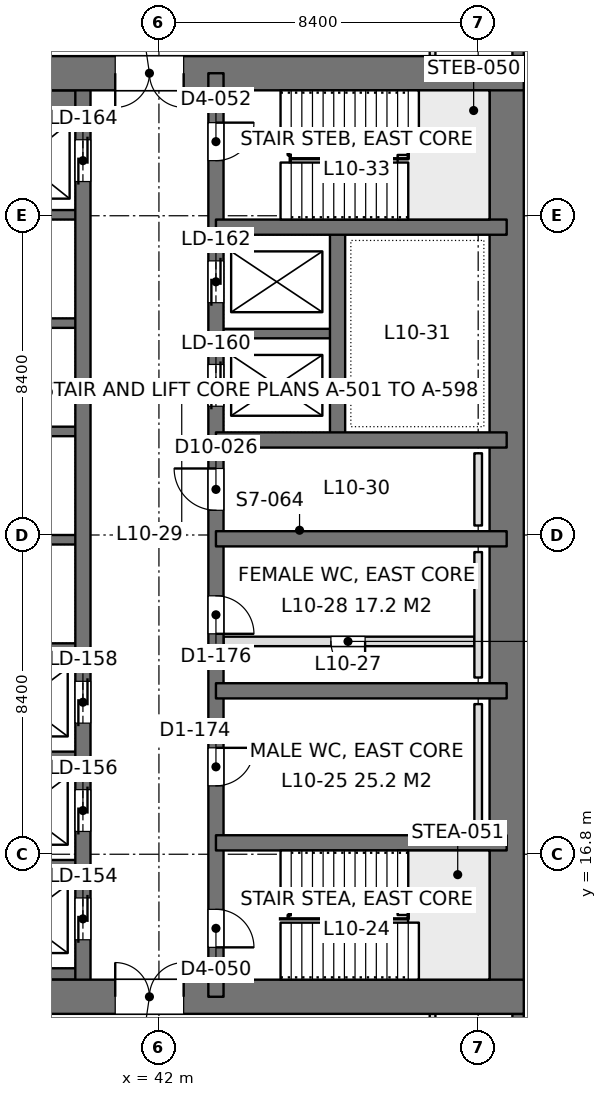
"""IFC4 building model, lengths in metres.
Left out: names, types, materials, properties, quantities, classifications, styles, units other than length and angle.
Written with IfcOpenShell. Run it as: python <this file> out.ifc"""

import sys

from ifc_helpers import new_model, si_unit, direction, frame, frame_2d, origin, place, context, subcontext, project, spatial, rectangle, extrude, element, fill, save


model = new_model("IFC4")
c1 = context("Model", 3, precision=1e-05, world=origin(), true_north=direction((0.0, 1.0)))
c2 = subcontext(c1, "Body", "Model", "MODEL_VIEW")
j1 = project(units=[si_unit("LENGTHUNIT", "METRE"), si_unit("PLANEANGLEUNIT", "RADIAN")], contexts=[c1])
p1 = place(None, origin())
s1 = spatial("IfcSite", under=j1, at=p1, CompositionType="ELEMENT")
p2 = place(p1, origin())
s2 = spatial("IfcBuilding", under=s1, at=p2, CompositionType="ELEMENT")
p3 = place(p2, frame((0.0, 0.0, 45.9)))
s3 = spatial("IfcBuildingStorey", under=s2, at=p3, CompositionType="ELEMENT", Elevation=45.9)
p4 = place(p3, frame((33.6, 13.05, 0.0), z_axis=(0.0, 0.0, 1.0), x_axis=(1.0, 0.0, 0.0)))
e1 = element("IfcWall", 1, at=p4, inside=s3, PredefinedType="SHEAR", context=c2, shape_type="SweptSolid", body=[
    extrude(rectangle(XDim=18.0, YDim=0.9, at=frame_2d((9.0, 0.0))), origin(), (0.0, 0.0, 1.0), 4.5),
])
p5 = place(p4, frame((7.25, 0.0, 0.0)))
e2 = element("IfcOpeningElement", 2, at=p5, cuts=e1, PredefinedType="OPENING", context=c2, shape_type="SweptSolid", body=[
    extrude(rectangle(XDim=1.8, YDim=2.4, at=frame_2d((0.9, 1.2))), frame((0.0, 0.46, 0.0), z_axis=(0.0, -1.0, 0.0), x_axis=(1.0, 0.0, 0.0)), (0.0, 0.0, 1.0), 0.92),
])
p6 = place(p3, frame((33.6, 37.35, 0.0), z_axis=(0.0, 0.0, 1.0), x_axis=(1.0, 0.0, 0.0)))
e3 = element("IfcWall", 3, at=p6, inside=s3, PredefinedType="SHEAR", context=c2, shape_type="SweptSolid", body=[
    extrude(rectangle(XDim=18.0, YDim=0.9, at=frame_2d((9.0, 0.0))), origin(), (0.0, 0.0, 1.0), 4.5),
])
p7 = place(p6, frame((7.25, 0.0, 0.0)))
e4 = element("IfcOpeningElement", 4, at=p7, cuts=e3, PredefinedType="OPENING", context=c2, shape_type="SweptSolid", body=[
    extrude(rectangle(XDim=1.8, YDim=2.4, at=frame_2d((0.9, 1.2))), frame((0.0, 0.46, 0.0), z_axis=(0.0, -1.0, 0.0), x_axis=(1.0, 0.0, 0.0)), (0.0, 0.0, 1.0), 0.92),
])
p8 = place(p3, frame((51.15, 13.05, 0.0), z_axis=(0.0, 0.0, 1.0), x_axis=(0.0, 1.0, 0.0)))
e5 = element("IfcWall", 5, at=p8, inside=s3, PredefinedType="SHEAR", context=c2, shape_type="SweptSolid", body=[
    extrude(rectangle(XDim=24.3, YDim=0.9, at=frame_2d((12.15, 0.0))), origin(), (0.0, 0.0, 1.0), 4.5),
])
p9 = place(p3, frame((43.5, 13.05, 0.0), z_axis=(0.0, 0.0, 1.0), x_axis=(0.0, 1.0, 0.0)))
e6 = element("IfcWall", 6, at=p9, inside=s3, PredefinedType="SHEAR", context=c2, shape_type="SweptSolid", body=[
    extrude(rectangle(XDim=24.3, YDim=0.4, at=frame_2d((12.15, 0.0))), origin(), (0.0, 0.0, 1.0), 4.5),
])
p10 = place(p9, frame((1.3, 0.0, 0.0)))
e7 = element("IfcOpeningElement", 7, at=p10, cuts=e6, PredefinedType="OPENING", context=c2, shape_type="SweptSolid", body=[
    extrude(rectangle(XDim=1.0, YDim=2.2, at=frame_2d((0.5, 1.1))), frame((0.0, 0.21, 0.0), z_axis=(0.0, -1.0, 0.0), x_axis=(1.0, 0.0, 0.0)), (0.0, 0.0, 1.0), 0.42),
])
p11 = place(p9, frame((22.0, 0.0, 0.0)))
e8 = element("IfcOpeningElement", 8, at=p11, cuts=e6, PredefinedType="OPENING", context=c2, shape_type="SweptSolid", body=[
    extrude(rectangle(XDim=1.0, YDim=2.2, at=frame_2d((0.5, 1.1))), frame((0.0, 0.21, 0.0), z_axis=(0.0, -1.0, 0.0), x_axis=(1.0, 0.0, 0.0)), (0.0, 0.0, 1.0), 0.42),
])
p12 = place(p9, frame((5.55, 0.0, 0.0)))
e9 = element("IfcOpeningElement", 9, at=p12, cuts=e6, PredefinedType="OPENING", context=c2, shape_type="SweptSolid", body=[
    extrude(rectangle(XDim=1.0, YDim=2.2, at=frame_2d((0.5, 1.1))), frame((0.0, 0.21, 0.0), z_axis=(0.0, -1.0, 0.0), x_axis=(1.0, 0.0, 0.0)), (0.0, 0.0, 1.0), 0.42),
])
p13 = place(p9, frame((9.55, 0.0, 0.0)))
e10 = element("IfcOpeningElement", 10, at=p13, cuts=e6, PredefinedType="OPENING", context=c2, shape_type="SweptSolid", body=[
    extrude(rectangle(XDim=1.0, YDim=2.2, at=frame_2d((0.5, 1.1))), frame((0.0, 0.21, 0.0), z_axis=(0.0, -1.0, 0.0), x_axis=(1.0, 0.0, 0.0)), (0.0, 0.0, 1.0), 0.42),
])
p14 = place(p9, frame((12.8, 0.0, 0.0)))
e11 = element("IfcOpeningElement", 11, at=p14, cuts=e6, PredefinedType="OPENING", context=c2, shape_type="SweptSolid", body=[
    extrude(rectangle(XDim=1.1, YDim=2.2, at=frame_2d((0.55, 1.1))), frame((0.0, 0.21, 0.0), z_axis=(0.0, -1.0, 0.0), x_axis=(1.0, 0.0, 0.0)), (0.0, 0.0, 1.0), 0.42),
])
p15 = place(p9, frame((15.538, 0.0, 0.0)))
e12 = element("IfcOpeningElement", 12, at=p15, cuts=e6, PredefinedType="OPENING", context=c2, shape_type="SweptSolid", body=[
    extrude(rectangle(XDim=1.1, YDim=2.2, at=frame_2d((0.55, 1.1))), frame((0.0, 0.21, 0.0), z_axis=(0.0, -1.0, 0.0), x_axis=(1.0, 0.0, 0.0)), (0.0, 0.0, 1.0), 0.42),
])
p16 = place(p9, frame((18.262, 0.0, 0.0)))
e13 = element("IfcOpeningElement", 13, at=p16, cuts=e6, PredefinedType="OPENING", context=c2, shape_type="SweptSolid", body=[
    extrude(rectangle(XDim=1.1, YDim=2.2, at=frame_2d((0.55, 1.1))), frame((0.0, 0.21, 0.0), z_axis=(0.0, -1.0, 0.0), x_axis=(1.0, 0.0, 0.0)), (0.0, 0.0, 1.0), 0.42),
])
p17 = place(p3, frame((40.0, 13.05, 0.0), z_axis=(0.0, 0.0, 1.0), x_axis=(0.0, 1.0, 0.0)))
e14 = element("IfcWall", 14, at=p17, inside=s3, PredefinedType="SHEAR", context=c2, shape_type="SweptSolid", body=[
    extrude(rectangle(XDim=24.3, YDim=0.4, at=frame_2d((12.15, 0.0))), origin(), (0.0, 0.0, 1.0), 4.5),
])
p18 = place(p17, frame((1.5, 0.0, 0.0)))
e15 = element("IfcOpeningElement", 15, at=p18, cuts=e14, PredefinedType="OPENING", context=c2, shape_type="SweptSolid", body=[
    extrude(rectangle(XDim=1.1, YDim=2.2, at=frame_2d((0.55, 1.1))), frame((0.0, 0.21, 0.0), z_axis=(0.0, -1.0, 0.0), x_axis=(1.0, 0.0, 0.0)), (0.0, 0.0, 1.0), 0.42),
])
p19 = place(p17, frame((4.35, 0.0, 0.0)))
e16 = element("IfcOpeningElement", 16, at=p19, cuts=e14, PredefinedType="OPENING", context=c2, shape_type="SweptSolid", body=[
    extrude(rectangle(XDim=1.1, YDim=2.2, at=frame_2d((0.55, 1.1))), frame((0.0, 0.21, 0.0), z_axis=(0.0, -1.0, 0.0), x_axis=(1.0, 0.0, 0.0)), (0.0, 0.0, 1.0), 0.42),
])
p20 = place(p17, frame((7.2, 0.0, 0.0)))
e17 = element("IfcOpeningElement", 17, at=p20, cuts=e14, PredefinedType="OPENING", context=c2, shape_type="SweptSolid", body=[
    extrude(rectangle(XDim=1.1, YDim=2.2, at=frame_2d((0.55, 1.1))), frame((0.0, 0.21, 0.0), z_axis=(0.0, -1.0, 0.0), x_axis=(1.0, 0.0, 0.0)), (0.0, 0.0, 1.0), 0.42),
])
p21 = place(p17, frame((21.45, 0.0, 0.0)))
e18 = element("IfcOpeningElement", 18, at=p21, cuts=e14, PredefinedType="OPENING", context=c2, shape_type="SweptSolid", body=[
    extrude(rectangle(XDim=1.1, YDim=2.2, at=frame_2d((0.55, 1.1))), frame((0.0, 0.21, 0.0), z_axis=(0.0, -1.0, 0.0), x_axis=(1.0, 0.0, 0.0)), (0.0, 0.0, 1.0), 0.42),
])
for number, where, z_axis, x_axis in (
    (19, (51.15, 17.1, 0.0), (0.0, 0.0, 1.0), (-1.0, 0.0, 0.0)),
    (20, (51.15, 21.1, 0.0), (0.0, 0.0, 1.0), (-1.0, 0.0, 0.0)),
    (21, (51.15, 25.1, 0.0), (0.0, 0.0, 1.0), (-1.0, 0.0, 0.0)),
    (22, (51.15, 27.7, 0.0), (0.0, 0.0, 1.0), (-1.0, 0.0, 0.0)),
    (23, (51.15, 33.3, 0.0), (0.0, 0.0, 1.0), (-1.0, 0.0, 0.0)),
):
    element("IfcWall", number, at=place(p3, frame(where, z_axis=z_axis, x_axis=x_axis)), inside=s3, PredefinedType="SHEAR", context=c2, shape_type="SweptSolid", body=[
        extrude(rectangle(XDim=7.65, YDim=0.4, at=frame_2d((3.825, 0.0))), origin(), (0.0, 0.0, 1.0), 4.5),
    ])
p22 = place(p3, frame((46.7, 27.7, 0.0), z_axis=(0.0, 0.0, 1.0), x_axis=(0.0, 1.0, 0.0)))
e24 = element("IfcWall", 24, at=p22, inside=s3, PredefinedType="SHEAR", context=c2, shape_type="SweptSolid", body=[
    extrude(rectangle(XDim=5.6, YDim=0.4, at=frame_2d((2.8, 0.0))), origin(), (0.0, 0.0, 1.0), 4.5),
])
p23 = place(p3, frame((46.7, 30.5, 0.0), z_axis=(0.0, 0.0, 1.0), x_axis=(-1.0, 0.0, 0.0)))
e25 = element("IfcWall", 25, at=p23, inside=s3, PredefinedType="SHEAR", context=c2, shape_type="SweptSolid", body=[
    extrude(rectangle(XDim=3.2, YDim=0.25, at=frame_2d((1.6, 0.0))), origin(), (0.0, 0.0, 1.0), 4.5),
])
p24 = place(p3, frame((40.0, 13.65, 0.0), z_axis=(0.0, 0.0, 1.0), x_axis=(-1.0, 0.0, 0.0)))
e26 = element("IfcWall", 26, at=p24, inside=s3, PredefinedType="SHEAR", context=c2, shape_type="SweptSolid", body=[
    extrude(rectangle(XDim=3.2, YDim=0.3, at=frame_2d((1.6, 0.0))), origin(), (0.0, 0.0, 1.0), 4.5),
])
for number, where, z_axis, x_axis in (
    (27, (40.0, 16.525, 0.0), (0.0, 0.0, 1.0), (-1.0, 0.0, 0.0)),
    (28, (40.0, 19.375, 0.0), (0.0, 0.0, 1.0), (-1.0, 0.0, 0.0)),
    (29, (40.0, 22.225, 0.0), (0.0, 0.0, 1.0), (-1.0, 0.0, 0.0)),
    (30, (40.0, 25.075, 0.0), (0.0, 0.0, 1.0), (-1.0, 0.0, 0.0)),
    (31, (40.0, 27.925, 0.0), (0.0, 0.0, 1.0), (-1.0, 0.0, 0.0)),
    (32, (40.0, 30.775, 0.0), (0.0, 0.0, 1.0), (-1.0, 0.0, 0.0)),
    (33, (40.0, 33.625, 0.0), (0.0, 0.0, 1.0), (-1.0, 0.0, 0.0)),
):
    element("IfcWall", number, at=place(p3, frame(where, z_axis=z_axis, x_axis=x_axis)), inside=s3, PredefinedType="SHEAR", context=c2, shape_type="SweptSolid", body=[
        extrude(rectangle(XDim=3.2, YDim=0.25, at=frame_2d((1.6, 0.0))), origin(), (0.0, 0.0, 1.0), 4.5),
    ])
p25 = place(p3, frame((40.0, 36.625, 0.0), z_axis=(0.0, 0.0, 1.0), x_axis=(-1.0, 0.0, 0.0)))
e34 = element("IfcWall", 34, at=p25, inside=s3, PredefinedType="SHEAR", context=c2, shape_type="SweptSolid", body=[
    extrude(rectangle(XDim=3.2, YDim=0.55, at=frame_2d((1.6, 0.0))), origin(), (0.0, 0.0, 1.0), 4.5),
])
p26 = place(p3, frame((51.45, 42.0, 0.0), z_axis=(0.0, 0.0, 1.0), x_axis=(0.0, -1.0, 0.0)))
e35 = element("IfcWall", 35, at=p26, inside=s3, PredefinedType="SOLIDWALL", context=c2, shape_type="SweptSolid", body=[
    extrude(rectangle(XDim=4.2, YDim=0.3, at=frame_2d((2.1, 0.0))), origin(), (0.0, 0.0, 1.0), 4.34),
])
p27 = place(p26, frame((0.9, 0.0, 0.9)))
e36 = element("IfcOpeningElement", 36, at=p27, cuts=e35, PredefinedType="OPENING", context=c2, shape_type="SweptSolid", body=[
    extrude(rectangle(XDim=2.4, YDim=1.9, at=frame_2d((1.2, 0.95))), frame((0.0, 0.16, 0.0), z_axis=(0.0, -1.0, 0.0), x_axis=(1.0, 0.0, 0.0)), (0.0, 0.0, 1.0), 0.32),
])
p28 = place(p3, frame((51.45, 12.6, 0.0), z_axis=(0.0, 0.0, 1.0), x_axis=(0.0, -1.0, 0.0)))
e37 = element("IfcWall", 37, at=p28, inside=s3, PredefinedType="SOLIDWALL", context=c2, shape_type="SweptSolid", body=[
    extrude(rectangle(XDim=4.2, YDim=0.3, at=frame_2d((2.1, 0.0))), origin(), (0.0, 0.0, 1.0), 4.34),
])
p29 = place(p28, frame((0.9, 0.0, 0.9)))
e38 = element("IfcOpeningElement", 38, at=p29, cuts=e37, PredefinedType="OPENING", context=c2, shape_type="SweptSolid", body=[
    extrude(rectangle(XDim=2.4, YDim=1.9, at=frame_2d((1.2, 0.95))), frame((0.0, 0.16, 0.0), z_axis=(0.0, -1.0, 0.0), x_axis=(1.0, 0.0, 0.0)), (0.0, 0.0, 1.0), 0.32),
])
p30 = place(p3, frame((49.2, 10.8, 0.0), z_axis=(0.0, 0.0, 1.0), x_axis=(0.0, 1.0, 0.0)))
e39 = element("IfcWall", 39, at=p30, inside=s3, PredefinedType="PARTITIONING", context=c2, shape_type="SweptSolid", body=[
    extrude(rectangle(XDim=1.802, YDim=0.15, at=frame_2d((0.901, 0.0))), origin(), (0.0, 0.0, 1.0), 4.34),
])
p31 = place(p3, frame((49.2, 37.8, 0.0), z_axis=(0.0, 0.0, 1.0), x_axis=(0.0, 1.0, 0.0)))
e40 = element("IfcWall", 40, at=p31, inside=s3, PredefinedType="PARTITIONING", context=c2, shape_type="SweptSolid", body=[
    extrude(rectangle(XDim=1.8, YDim=0.15, at=frame_2d((0.9, 0.0))), origin(), (0.0, 0.0, 1.0), 4.34),
])
p32 = place(p3, frame((43.7, 22.4, 0.0), z_axis=(0.0, 0.0, 1.0), x_axis=(1.0, 0.0, 0.0)))
e41 = element("IfcWall", 41, at=p32, inside=s3, PredefinedType="PARTITIONING", context=c2, shape_type="SweptSolid", body=[
    extrude(rectangle(XDim=6.6, YDim=0.25, at=frame_2d((3.3, 0.0))), origin(), (0.0, 0.0, 1.0), 4.3),
])
p33 = place(p32, frame((2.825, 0.0, 0.0)))
e42 = element("IfcOpeningElement", 42, at=p33, cuts=e41, PredefinedType="OPENING", context=c2, shape_type="SweptSolid", body=[
    extrude(rectangle(XDim=0.9, YDim=2.2, at=frame_2d((0.45, 1.1))), frame((0.0, 0.135, 0.0), z_axis=(0.0, -1.0, 0.0), x_axis=(1.0, 0.0, 0.0)), (0.0, 0.0, 1.0), 0.27),
])
for number, where, z_axis, x_axis in (
    (43, (50.4, 17.45, 0.0), (0.0, 0.0, 1.0), (0.0, 1.0, 0.0)),
    (44, (50.4, 21.45, 0.0), (0.0, 0.0, 1.0), (0.0, 1.0, 0.0)),
):
    element("IfcWall", number, at=place(p3, frame(where, z_axis=z_axis, x_axis=x_axis)), inside=s3, PredefinedType="PLUMBINGWALL", context=c2, shape_type="SweptSolid", body=[
        extrude(rectangle(XDim=3.3, YDim=0.2, at=frame_2d((1.65, 0.0))), origin(), (0.0, 0.0, 1.0), 1.2),
    ])
p34 = place(p3, frame((50.4, 25.45, 0.0), z_axis=(0.0, 0.0, 1.0), x_axis=(0.0, 1.0, 0.0)))
e45 = element("IfcWall", 45, at=p34, inside=s3, PredefinedType="PLUMBINGWALL", context=c2, shape_type="SweptSolid", body=[
    extrude(rectangle(XDim=1.9, YDim=0.2, at=frame_2d((0.95, 0.0))), origin(), (0.0, 0.0, 1.0), 1.2),
])
p35 = place(p5, origin())
e46 = element("IfcDoor", 46, at=p35, inside=s3, OperationType="DOUBLE_DOOR_SINGLE_SWING", PredefinedType="DOOR", context=c2, shape_type="SweptSolid", body=[
    extrude(rectangle(XDim=1.8, YDim=2.4, at=frame_2d((0.9, 1.2))), frame((0.0, 0.025, 0.0), z_axis=(0.0, -1.0, 0.0), x_axis=(1.0, 0.0, 0.0)), (0.0, 0.0, 1.0), 0.05),
])
fill(e2, e46)
p36 = place(p7, frame((1.8, 0.0, 0.0), z_axis=(0.0, 0.0, 1.0), x_axis=(-1.0, 0.0, 0.0)))
e47 = element("IfcDoor", 47, at=p36, inside=s3, OperationType="DOUBLE_DOOR_SINGLE_SWING", PredefinedType="DOOR", context=c2, shape_type="SweptSolid", body=[
    extrude(rectangle(XDim=1.8, YDim=2.4, at=frame_2d((0.9, 1.2))), frame((0.0, 0.025, 0.0), z_axis=(0.0, -1.0, 0.0), x_axis=(1.0, 0.0, 0.0)), (0.0, 0.0, 1.0), 0.05),
])
fill(e4, e47)
p37 = place(p10, frame((1.0, 0.0, 0.0), z_axis=(0.0, 0.0, 1.0), x_axis=(-1.0, 0.0, 0.0)))
e48 = element("IfcDoor", 48, at=p37, inside=s3, OperationType="SINGLE_SWING_RIGHT", PredefinedType="DOOR", context=c2, shape_type="SweptSolid", body=[
    extrude(rectangle(XDim=1.0, YDim=2.2, at=frame_2d((0.5, 1.1))), frame((0.0, 0.025, 0.0), z_axis=(0.0, -1.0, 0.0), x_axis=(1.0, 0.0, 0.0)), (0.0, 0.0, 1.0), 0.05),
])
fill(e7, e48)
p38 = place(p11, frame((1.0, 0.0, 0.0), z_axis=(0.0, 0.0, 1.0), x_axis=(-1.0, 0.0, 0.0)))
e49 = element("IfcDoor", 49, at=p38, inside=s3, OperationType="SINGLE_SWING_LEFT", PredefinedType="DOOR", context=c2, shape_type="SweptSolid", body=[
    extrude(rectangle(XDim=1.0, YDim=2.2, at=frame_2d((0.5, 1.1))), frame((0.0, 0.025, 0.0), z_axis=(0.0, -1.0, 0.0), x_axis=(1.0, 0.0, 0.0)), (0.0, 0.0, 1.0), 0.05),
])
fill(e8, e49)
p39 = place(p12, frame((1.0, 0.0, 0.0), z_axis=(0.0, 0.0, 1.0), x_axis=(-1.0, 0.0, 0.0)))
e50 = element("IfcDoor", 50, at=p39, inside=s3, OperationType="SINGLE_SWING_LEFT", PredefinedType="DOOR", context=c2, shape_type="SweptSolid", body=[
    extrude(rectangle(XDim=1.0, YDim=2.2, at=frame_2d((0.5, 1.1))), frame((0.0, 0.025, 0.0), z_axis=(0.0, -1.0, 0.0), x_axis=(1.0, 0.0, 0.0)), (0.0, 0.0, 1.0), 0.05),
])
fill(e9, e50)
p40 = place(p13, frame((1.0, 0.0, 0.0), z_axis=(0.0, 0.0, 1.0), x_axis=(-1.0, 0.0, 0.0)))
e51 = element("IfcDoor", 51, at=p40, inside=s3, OperationType="SINGLE_SWING_RIGHT", PredefinedType="DOOR", context=c2, shape_type="SweptSolid", body=[
    extrude(rectangle(XDim=1.0, YDim=2.2, at=frame_2d((0.5, 1.1))), frame((0.0, 0.025, 0.0), z_axis=(0.0, -1.0, 0.0), x_axis=(1.0, 0.0, 0.0)), (0.0, 0.0, 1.0), 0.05),
])
fill(e10, e51)
p41 = place(p14, origin())
e52 = element("IfcDoor", 52, at=p41, inside=s3, OperationType="SINGLE_SWING_RIGHT", PredefinedType="DOOR", context=c2, shape_type="SweptSolid", body=[
    extrude(rectangle(XDim=1.1, YDim=2.2, at=frame_2d((0.55, 1.1))), frame((0.0, 0.025, 0.0), z_axis=(0.0, -1.0, 0.0), x_axis=(1.0, 0.0, 0.0)), (0.0, 0.0, 1.0), 0.05),
])
fill(e11, e52)
p42 = place(p18, origin())
e53 = element("IfcDoor", 53, at=p42, inside=s3, OperationType="DOUBLE_DOOR_SLIDING", PredefinedType="DOOR", context=c2, shape_type="SweptSolid", body=[
    extrude(rectangle(XDim=1.1, YDim=2.2, at=frame_2d((0.55, 1.1))), frame((0.0, 0.025, 0.0), z_axis=(0.0, -1.0, 0.0), x_axis=(1.0, 0.0, 0.0)), (0.0, 0.0, 1.0), 0.05),
])
fill(e15, e53)
p43 = place(p19, origin())
e54 = element("IfcDoor", 54, at=p43, inside=s3, OperationType="DOUBLE_DOOR_SLIDING", PredefinedType="DOOR", context=c2, shape_type="SweptSolid", body=[
    extrude(rectangle(XDim=1.1, YDim=2.2, at=frame_2d((0.55, 1.1))), frame((0.0, 0.025, 0.0), z_axis=(0.0, -1.0, 0.0), x_axis=(1.0, 0.0, 0.0)), (0.0, 0.0, 1.0), 0.05),
])
fill(e16, e54)
p44 = place(p20, origin())
e55 = element("IfcDoor", 55, at=p44, inside=s3, OperationType="DOUBLE_DOOR_SLIDING", PredefinedType="DOOR", context=c2, shape_type="SweptSolid", body=[
    extrude(rectangle(XDim=1.1, YDim=2.2, at=frame_2d((0.55, 1.1))), frame((0.0, 0.025, 0.0), z_axis=(0.0, -1.0, 0.0), x_axis=(1.0, 0.0, 0.0)), (0.0, 0.0, 1.0), 0.05),
])
fill(e17, e55)
p45 = place(p21, origin())
e56 = element("IfcDoor", 56, at=p45, inside=s3, OperationType="DOUBLE_DOOR_SLIDING", PredefinedType="DOOR", context=c2, shape_type="SweptSolid", body=[
    extrude(rectangle(XDim=1.1, YDim=2.2, at=frame_2d((0.55, 1.1))), frame((0.0, 0.025, 0.0), z_axis=(0.0, -1.0, 0.0), x_axis=(1.0, 0.0, 0.0)), (0.0, 0.0, 1.0), 0.05),
])
fill(e18, e56)
p46 = place(p15, origin())
e57 = element("IfcDoor", 57, at=p46, inside=s3, OperationType="DOUBLE_DOOR_SLIDING", PredefinedType="DOOR", context=c2, shape_type="SweptSolid", body=[
    extrude(rectangle(XDim=1.1, YDim=2.2, at=frame_2d((0.55, 1.1))), frame((0.0, 0.025, 0.0), z_axis=(0.0, -1.0, 0.0), x_axis=(1.0, 0.0, 0.0)), (0.0, 0.0, 1.0), 0.05),
])
fill(e12, e57)
p47 = place(p16, origin())
e58 = element("IfcDoor", 58, at=p47, inside=s3, OperationType="DOUBLE_DOOR_SLIDING", PredefinedType="DOOR", context=c2, shape_type="SweptSolid", body=[
    extrude(rectangle(XDim=1.1, YDim=2.2, at=frame_2d((0.55, 1.1))), frame((0.0, 0.025, 0.0), z_axis=(0.0, -1.0, 0.0), x_axis=(1.0, 0.0, 0.0)), (0.0, 0.0, 1.0), 0.05),
])
fill(e13, e58)
p48 = place(p33, frame((0.9, 0.0, 0.0), z_axis=(0.0, 0.0, 1.0), x_axis=(-1.0, 0.0, 0.0)))
e59 = element("IfcDoor", 59, at=p48, inside=s3, OperationType="SINGLE_SWING_LEFT", PredefinedType="DOOR", context=c2, shape_type="SweptSolid", body=[
    extrude(rectangle(XDim=0.9, YDim=2.2, at=frame_2d((0.45, 1.1))), frame((0.0, 0.025, 0.0), z_axis=(0.0, -1.0, 0.0), x_axis=(1.0, 0.0, 0.0)), (0.0, 0.0, 1.0), 0.05),
])
fill(e42, e59)
save(model, sys.argv[1])
